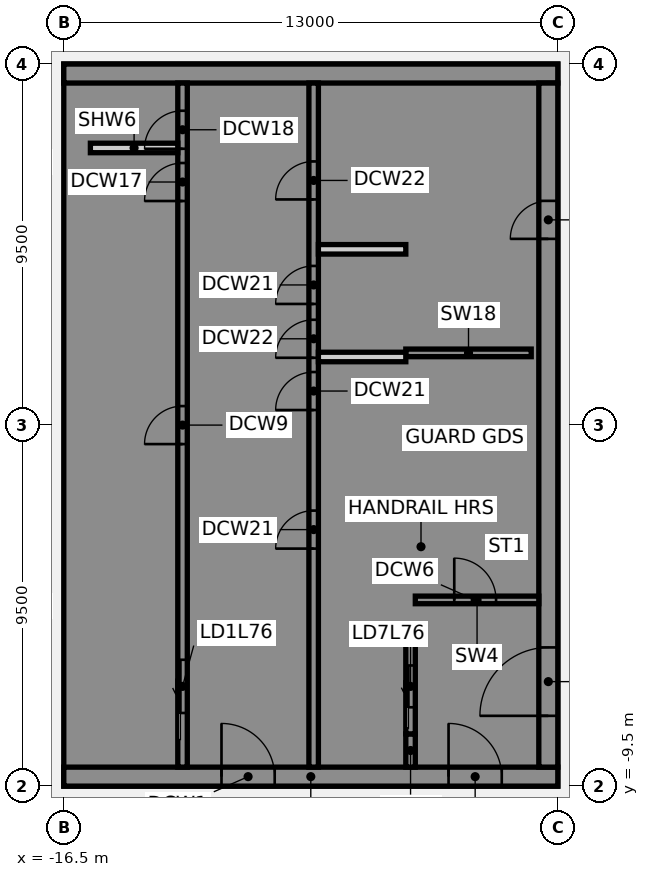
"""IFC4 building model, lengths in metres.
Left out: names, types, materials, properties, quantities, classifications, styles, units other than length and angle.
Written with IfcOpenShell. Run it as: python <this file> out.ifc"""

import sys

from ifc_helpers import new_model, si_unit, direction, frame, frame_2d, origin, place, context, subcontext, project, spatial, polyline, rectangle, outline, extrude, element, fill, save


model = new_model("IFC4")
c1 = context("Model", 3, precision=1e-05, world=origin(), true_north=direction((0.0, 1.0)))
c2 = subcontext(c1, "Body", "Model", "MODEL_VIEW")
j1 = project(units=[si_unit("LENGTHUNIT", "METRE"), si_unit("PLANEANGLEUNIT", "RADIAN")], contexts=[c1])
p1 = place(None, origin())
s1 = spatial("IfcSite", under=j1, at=p1, CompositionType="ELEMENT")
p2 = place(p1, origin())
s2 = spatial("IfcBuilding", under=s1, at=p2, CompositionType="ELEMENT")
p3 = place(p2, frame((0.0, 0.0, 309.4)))
s3 = spatial("IfcBuildingStorey", under=s2, at=p3, CompositionType="ELEMENT", Elevation=309.4)
p4 = place(p3, frame((-16.5, -9.25, 0.0), z_axis=(0.0, 0.0, 1.0), x_axis=(1.0, 0.0, 0.0)))
e1 = element("IfcWall", 1, at=p4, inside=s3, PredefinedType="SHEAR", context=c2, shape_type="SweptSolid", body=[
    extrude(rectangle(XDim=13.0, YDim=0.5, at=frame_2d((6.5, 0.0))), origin(), (0.0, 0.0, 1.0), 3.82),
])
p5 = place(p4, frame((4.15, 0.0, 0.0)))
e2 = element("IfcOpeningElement", 2, at=p5, cuts=e1, PredefinedType="OPENING", context=c2, shape_type="SweptSolid", body=[
    extrude(rectangle(XDim=1.4, YDim=2.1, at=frame_2d((0.7, 1.05))), frame((0.0, 0.26, 0.0), z_axis=(0.0, -1.0, 0.0), x_axis=(1.0, 0.0, 0.0)), (0.0, 0.0, 1.0), 0.52),
])
p6 = place(p4, frame((10.125, 0.0, 0.0)))
e3 = element("IfcOpeningElement", 3, at=p6, cuts=e1, PredefinedType="OPENING", context=c2, shape_type="SweptSolid", body=[
    extrude(rectangle(XDim=1.4, YDim=2.1, at=frame_2d((0.7, 1.05))), frame((0.0, 0.26, 0.0), z_axis=(0.0, -1.0, 0.0), x_axis=(1.0, 0.0, 0.0)), (0.0, 0.0, 1.0), 0.52),
])
p7 = place(p3, origin())
e4 = element("IfcWall", 4, at=p7, inside=s3, PredefinedType="SHEAR", context=c2, shape_type="SweptSolid", body=[
    extrude(outline(polyline([(-13.5, -8.125), (-16.0, -8.125), (-16.0, -5.625), (-13.5, -5.625), (-13.5, -5.375), (-16.0, -5.375), (-16.0, 8.125), (-13.5, 8.125), (-13.5, 9.0), (-16.0, 9.0), (-16.5, 9.0), (-16.5, -9.0), (-16.0, -9.0), (-13.5, -9.0), (-13.5, -8.125)])), origin(), (0.0, 0.0, 1.0), 3.82),
])
p8 = place(p3, frame((-16.5, 9.25, 0.0), z_axis=(0.0, 0.0, 1.0), x_axis=(1.0, 0.0, 0.0)))
e5 = element("IfcWall", 5, at=p8, inside=s3, PredefinedType="SHEAR", context=c2, shape_type="SweptSolid", body=[
    extrude(rectangle(XDim=13.0, YDim=0.5, at=frame_2d((6.5, 0.0))), origin(), (0.0, 0.0, 1.0), 3.82),
])
p9 = place(p3, origin())
e6 = element("IfcWall", 6, at=p9, inside=s3, PredefinedType="SHEAR", context=c2, shape_type="SweptSolid", body=[
    extrude(outline(polyline([(-9.8, -5.625), (-7.5, -5.625), (-7.25, -5.625), (-7.25, 9.0), (-7.5, 9.0), (-9.8, 9.0), (-9.8, 8.125), (-7.5, 8.125), (-7.5, -5.375), (-9.8, -5.375), (-9.8, -5.625)])), origin(), (0.0, 0.0, 1.0), 3.82),
])
p10 = place(p3, origin())
e7 = element("IfcWall", 7, at=p10, inside=s3, PredefinedType="SHEAR", context=c2, shape_type="SweptSolid", body=[
    extrude(outline(polyline([(-7.5, -8.125), (-9.55, -8.125), (-9.55, -5.625), (-9.8, -5.625), (-9.8, -8.125), (-9.8, -9.0), (-7.5, -9.0), (-7.5, -8.125)])), origin(), (0.0, 0.0, 1.0), 3.82),
])
p11 = place(p3, frame((-7.375, -9.0, 0.0), z_axis=(0.0, 0.0, 1.0), x_axis=(0.0, 1.0, 0.0)))
e8 = element("IfcWall", 8, at=p11, inside=s3, PredefinedType="SHEAR", context=c2, shape_type="SweptSolid", body=[
    extrude(rectangle(XDim=0.875, YDim=0.25, at=frame_2d((0.438, 0.0))), origin(), (0.0, 0.0, 1.0), 3.82),
])
p12 = place(p3, frame((-7.5, 1.9, 0.0), z_axis=(0.0, 0.0, 1.0), x_axis=(1.0, 0.0, 0.0)))
e9 = element("IfcWall", 9, at=p12, inside=s3, PredefinedType="SHEAR", context=c2, shape_type="SweptSolid", body=[
    extrude(rectangle(XDim=3.3, YDim=0.2, at=frame_2d((1.65, 0.0))), origin(), (0.0, 0.0, 1.0), 3.82),
])
p13 = place(p3, frame((-13.375, -9.0, 0.0), z_axis=(0.0, 0.0, 1.0), x_axis=(0.0, 1.0, 0.0)))
e10 = element("IfcWall", 10, at=p13, inside=s3, PredefinedType="SHEAR", context=c2, shape_type="SweptSolid", body=[
    extrude(rectangle(XDim=18.0, YDim=0.25, at=frame_2d((9.0, 0.0))), origin(), (0.0, 0.0, 1.0), 3.82),
])
p14 = place(p13, frame((1.425, 0.0, 0.0)))
e11 = element("IfcOpeningElement", 11, at=p14, cuts=e10, PredefinedType="OPENING", context=c2, shape_type="SweptSolid", body=[
    extrude(rectangle(XDim=1.4, YDim=2.1, at=frame_2d((0.7, 1.05))), frame((0.0, 0.135, 0.0), z_axis=(0.0, -1.0, 0.0), x_axis=(1.0, 0.0, 0.0)), (0.0, 0.0, 1.0), 0.27),
])
p15 = place(p13, frame((8.5, 0.0, 0.0)))
e12 = element("IfcOpeningElement", 12, at=p15, cuts=e10, PredefinedType="OPENING", context=c2, shape_type="SweptSolid", body=[
    extrude(rectangle(XDim=1.0, YDim=2.1, at=frame_2d((0.5, 1.05))), frame((0.0, 0.135, 0.0), z_axis=(0.0, -1.0, 0.0), x_axis=(1.0, 0.0, 0.0)), (0.0, 0.0, 1.0), 0.27),
])
p16 = place(p13, frame((14.896, 0.0, 0.0)))
e13 = element("IfcOpeningElement", 13, at=p16, cuts=e10, PredefinedType="OPENING", context=c2, shape_type="SweptSolid", body=[
    extrude(rectangle(XDim=1.0, YDim=2.1, at=frame_2d((0.5, 1.05))), frame((0.0, 0.135, 0.0), z_axis=(0.0, -1.0, 0.0), x_axis=(1.0, 0.0, 0.0)), (0.0, 0.0, 1.0), 0.27),
])
p17 = place(p13, frame((16.271, 0.0, 0.0)))
e14 = element("IfcOpeningElement", 14, at=p17, cuts=e10, PredefinedType="OPENING", context=c2, shape_type="SweptSolid", body=[
    extrude(rectangle(XDim=1.0, YDim=2.1, at=frame_2d((0.5, 1.05))), frame((0.0, 0.135, 0.0), z_axis=(0.0, -1.0, 0.0), x_axis=(1.0, 0.0, 0.0)), (0.0, 0.0, 1.0), 0.27),
])
p18 = place(p3, frame((-9.925, -9.0, 0.0), z_axis=(0.0, 0.0, 1.0), x_axis=(0.0, 1.0, 0.0)))
e15 = element("IfcWall", 15, at=p18, inside=s3, PredefinedType="SHEAR", context=c2, shape_type="SweptSolid", body=[
    extrude(rectangle(XDim=18.0, YDim=0.25, at=frame_2d((9.0, 0.0))), origin(), (0.0, 0.0, 1.0), 3.82),
])
p19 = place(p18, frame((5.75, 0.0, 0.0)))
e16 = element("IfcOpeningElement", 16, at=p19, cuts=e15, PredefinedType="OPENING", context=c2, shape_type="SweptSolid", body=[
    extrude(rectangle(XDim=1.0, YDim=2.1, at=frame_2d((0.5, 1.05))), frame((0.0, 0.135, 0.0), z_axis=(0.0, -1.0, 0.0), x_axis=(1.0, 0.0, 0.0)), (0.0, 0.0, 1.0), 0.27),
])
p20 = place(p18, frame((9.396, 0.0, 0.0)))
e17 = element("IfcOpeningElement", 17, at=p20, cuts=e15, PredefinedType="OPENING", context=c2, shape_type="SweptSolid", body=[
    extrude(rectangle(XDim=1.0, YDim=2.1, at=frame_2d((0.5, 1.05))), frame((0.0, 0.135, 0.0), z_axis=(0.0, -1.0, 0.0), x_axis=(1.0, 0.0, 0.0)), (0.0, 0.0, 1.0), 0.27),
])
p21 = place(p18, frame((10.771, 0.0, 0.0)))
e18 = element("IfcOpeningElement", 18, at=p21, cuts=e15, PredefinedType="OPENING", context=c2, shape_type="SweptSolid", body=[
    extrude(rectangle(XDim=1.0, YDim=2.1, at=frame_2d((0.5, 1.05))), frame((0.0, 0.135, 0.0), z_axis=(0.0, -1.0, 0.0), x_axis=(1.0, 0.0, 0.0)), (0.0, 0.0, 1.0), 0.27),
])
p22 = place(p18, frame((12.188, 0.0, 0.0)))
e19 = element("IfcOpeningElement", 19, at=p22, cuts=e15, PredefinedType="OPENING", context=c2, shape_type="SweptSolid", body=[
    extrude(rectangle(XDim=1.0, YDim=2.1, at=frame_2d((0.5, 1.05))), frame((0.0, 0.135, 0.0), z_axis=(0.0, -1.0, 0.0), x_axis=(1.0, 0.0, 0.0)), (0.0, 0.0, 1.0), 0.27),
])
p23 = place(p18, frame((14.938, 0.0, 0.0)))
e20 = element("IfcOpeningElement", 20, at=p23, cuts=e15, PredefinedType="OPENING", context=c2, shape_type="SweptSolid", body=[
    extrude(rectangle(XDim=1.0, YDim=2.1, at=frame_2d((0.5, 1.05))), frame((0.0, 0.135, 0.0), z_axis=(0.0, -1.0, 0.0), x_axis=(1.0, 0.0, 0.0)), (0.0, 0.0, 1.0), 0.27),
])
p24 = place(p3, frame((-7.375, -8.125, 0.0), z_axis=(0.0, 0.0, 1.0), x_axis=(0.0, 1.0, 0.0)))
e21 = element("IfcWall", 21, at=p24, inside=s3, PredefinedType="SHEAR", context=c2, shape_type="SweptSolid", body=[
    extrude(rectangle(XDim=2.5, YDim=0.25, at=frame_2d((1.25, 0.0))), origin(), (0.0, 0.0, 1.0), 3.82),
])
p25 = place(p24, frame((0.7, 0.0, 0.0)))
e22 = element("IfcOpeningElement", 22, at=p25, cuts=e21, PredefinedType="OPENING", context=c2, shape_type="SweptSolid", body=[
    extrude(rectangle(XDim=1.1, YDim=2.1, at=frame_2d((0.55, 1.05))), frame((0.0, 0.135, 0.0), z_axis=(0.0, -1.0, 0.0), x_axis=(1.0, 0.0, 0.0)), (0.0, 0.0, 1.0), 0.27),
])
p26 = place(p3, frame((-3.75, -9.0, 0.0), z_axis=(0.0, 0.0, 1.0), x_axis=(0.0, 1.0, 0.0)))
e23 = element("IfcWall", 23, at=p26, inside=s3, PredefinedType="SHEAR", context=c2, shape_type="SweptSolid", body=[
    extrude(rectangle(XDim=18.0, YDim=0.5, at=frame_2d((9.0, 0.0))), origin(), (0.0, 0.0, 1.0), 3.82),
])
p27 = place(p26, frame((1.35, 0.0, 0.0)))
e24 = element("IfcOpeningElement", 24, at=p27, cuts=e23, PredefinedType="OPENING", context=c2, shape_type="SweptSolid", body=[
    extrude(rectangle(XDim=1.8, YDim=2.1, at=frame_2d((0.9, 1.05))), frame((0.0, 0.26, 0.0), z_axis=(0.0, -1.0, 0.0), x_axis=(1.0, 0.0, 0.0)), (0.0, 0.0, 1.0), 0.52),
])
p28 = place(p26, frame((13.9, 0.0, 0.0)))
e25 = element("IfcOpeningElement", 25, at=p28, cuts=e23, PredefinedType="OPENING", context=c2, shape_type="SweptSolid", body=[
    extrude(rectangle(XDim=1.0, YDim=2.1, at=frame_2d((0.5, 1.05))), frame((0.0, 0.26, 0.0), z_axis=(0.0, -1.0, 0.0), x_axis=(1.0, 0.0, 0.0)), (0.0, 0.0, 1.0), 0.52),
])
p29 = place(p3, frame((-7.25, -4.6, 0.0), z_axis=(0.0, 0.0, 1.0), x_axis=(1.0, 0.0, 0.0)))
e26 = element("IfcWall", 26, at=p29, inside=s3, PredefinedType="SHEAR", context=c2, shape_type="SweptSolid", body=[
    extrude(rectangle(XDim=3.25, YDim=0.2, at=frame_2d((1.625, 0.0))), origin(), (0.0, 0.0, 1.0), 3.82),
])
p30 = place(p29, frame((1.025, 0.0, 0.0)))
e27 = element("IfcOpeningElement", 27, at=p30, cuts=e26, PredefinedType="OPENING", context=c2, shape_type="SweptSolid", body=[
    extrude(rectangle(XDim=1.1, YDim=2.1, at=frame_2d((0.55, 1.05))), frame((0.0, 0.11, 0.0), z_axis=(0.0, -1.0, 0.0), x_axis=(1.0, 0.0, 0.0)), (0.0, 0.0, 1.0), 0.22),
])
for number, where, z_axis, x_axis in (
    (28, (-15.8, 7.292, 0.0), (0.0, 0.0, 1.0), (1.0, 0.0, 0.0)),
    (29, (-9.8, 1.792, 0.0), (0.0, 0.0, 1.0), (1.0, 0.0, 0.0)),
    (30, (-9.8, 4.625, 0.0), (0.0, 0.0, 1.0), (1.0, 0.0, 0.0)),
):
    element("IfcWall", number, at=place(p3, frame(where, z_axis=z_axis, x_axis=x_axis)), inside=s3, PredefinedType="PARTITIONING", context=c2, shape_type="SweptSolid", body=[
        extrude(rectangle(XDim=2.3, YDim=0.25, at=frame_2d((1.15, 0.0))), origin(), (0.0, 0.0, 1.0), 3.82),
    ])
p31 = place(p5, origin())
e31 = element("IfcDoor", 31, at=p31, inside=s3, OperationType="SINGLE_SWING_LEFT", PredefinedType="DOOR", context=c2, shape_type="SweptSolid", body=[
    extrude(rectangle(XDim=1.4, YDim=2.1, at=frame_2d((0.7, 1.05))), frame((0.0, 0.025, 0.0), z_axis=(0.0, -1.0, 0.0), x_axis=(1.0, 0.0, 0.0)), (0.0, 0.0, 1.0), 0.05),
])
fill(e2, e31)
p32 = place(p6, origin())
e32 = element("IfcDoor", 32, at=p32, inside=s3, OperationType="SINGLE_SWING_LEFT", PredefinedType="DOOR", context=c2, shape_type="SweptSolid", body=[
    extrude(rectangle(XDim=1.4, YDim=2.1, at=frame_2d((0.7, 1.05))), frame((0.0, 0.025, 0.0), z_axis=(0.0, -1.0, 0.0), x_axis=(1.0, 0.0, 0.0)), (0.0, 0.0, 1.0), 0.05),
])
fill(e3, e32)
p33 = place(p27, origin())
e33 = element("IfcDoor", 33, at=p33, inside=s3, OperationType="SINGLE_SWING_LEFT", PredefinedType="DOOR", context=c2, shape_type="SweptSolid", body=[
    extrude(rectangle(XDim=1.8, YDim=2.1, at=frame_2d((0.9, 1.05))), frame((0.0, 0.025, 0.0), z_axis=(0.0, -1.0, 0.0), x_axis=(1.0, 0.0, 0.0)), (0.0, 0.0, 1.0), 0.05),
])
fill(e24, e33)
p34 = place(p28, origin())
e34 = element("IfcDoor", 34, at=p34, inside=s3, OperationType="SINGLE_SWING_LEFT", PredefinedType="DOOR", context=c2, shape_type="SweptSolid", body=[
    extrude(rectangle(XDim=1.0, YDim=2.1, at=frame_2d((0.5, 1.05))), frame((0.0, 0.025, 0.0), z_axis=(0.0, -1.0, 0.0), x_axis=(1.0, 0.0, 0.0)), (0.0, 0.0, 1.0), 0.05),
])
fill(e25, e34)
p35 = place(p30, origin())
e35 = element("IfcDoor", 35, at=p35, inside=s3, OperationType="SINGLE_SWING_LEFT", PredefinedType="DOOR", context=c2, shape_type="SweptSolid", body=[
    extrude(rectangle(XDim=1.1, YDim=2.1, at=frame_2d((0.55, 1.05))), frame((0.0, 0.025, 0.0), z_axis=(0.0, -1.0, 0.0), x_axis=(1.0, 0.0, 0.0)), (0.0, 0.0, 1.0), 0.05),
])
fill(e27, e35)
p36 = place(p14, origin())
e36 = element("IfcDoor", 36, at=p36, inside=s3, OperationType="SLIDING_TO_LEFT", PredefinedType="DOOR", context=c2, shape_type="SweptSolid", body=[
    extrude(rectangle(XDim=1.4, YDim=2.1, at=frame_2d((0.7, 1.05))), frame((0.0, 0.025, 0.0), z_axis=(0.0, -1.0, 0.0), x_axis=(1.0, 0.0, 0.0)), (0.0, 0.0, 1.0), 0.05),
])
fill(e11, e36)
p37 = place(p25, origin())
e37 = element("IfcDoor", 37, at=p37, inside=s3, OperationType="SLIDING_TO_LEFT", PredefinedType="DOOR", context=c2, shape_type="SweptSolid", body=[
    extrude(rectangle(XDim=1.1, YDim=2.1, at=frame_2d((0.55, 1.05))), frame((0.0, 0.025, 0.0), z_axis=(0.0, -1.0, 0.0), x_axis=(1.0, 0.0, 0.0)), (0.0, 0.0, 1.0), 0.05),
])
fill(e22, e37)
p38 = place(p15, origin())
e38 = element("IfcDoor", 38, at=p38, inside=s3, OperationType="SINGLE_SWING_LEFT", PredefinedType="DOOR", context=c2, shape_type="SweptSolid", body=[
    extrude(rectangle(XDim=1.0, YDim=2.1, at=frame_2d((0.5, 1.05))), frame((0.0, 0.025, 0.0), z_axis=(0.0, -1.0, 0.0), x_axis=(1.0, 0.0, 0.0)), (0.0, 0.0, 1.0), 0.05),
])
fill(e12, e38)
p39 = place(p16, origin())
e39 = element("IfcDoor", 39, at=p39, inside=s3, OperationType="SINGLE_SWING_LEFT", PredefinedType="DOOR", context=c2, shape_type="SweptSolid", body=[
    extrude(rectangle(XDim=1.0, YDim=2.1, at=frame_2d((0.5, 1.05))), frame((0.0, 0.025, 0.0), z_axis=(0.0, -1.0, 0.0), x_axis=(1.0, 0.0, 0.0)), (0.0, 0.0, 1.0), 0.05),
])
fill(e13, e39)
p40 = place(p17, origin())
e40 = element("IfcDoor", 40, at=p40, inside=s3, OperationType="SINGLE_SWING_LEFT", PredefinedType="DOOR", context=c2, shape_type="SweptSolid", body=[
    extrude(rectangle(XDim=1.0, YDim=2.1, at=frame_2d((0.5, 1.05))), frame((0.0, 0.025, 0.0), z_axis=(0.0, -1.0, 0.0), x_axis=(1.0, 0.0, 0.0)), (0.0, 0.0, 1.0), 0.05),
])
fill(e14, e40)
p41 = place(p19, origin())
e41 = element("IfcDoor", 41, at=p41, inside=s3, OperationType="SINGLE_SWING_LEFT", PredefinedType="DOOR", context=c2, shape_type="SweptSolid", body=[
    extrude(rectangle(XDim=1.0, YDim=2.1, at=frame_2d((0.5, 1.05))), frame((0.0, 0.025, 0.0), z_axis=(0.0, -1.0, 0.0), x_axis=(1.0, 0.0, 0.0)), (0.0, 0.0, 1.0), 0.05),
])
fill(e16, e41)
p42 = place(p20, origin())
e42 = element("IfcDoor", 42, at=p42, inside=s3, OperationType="SINGLE_SWING_LEFT", PredefinedType="DOOR", context=c2, shape_type="SweptSolid", body=[
    extrude(rectangle(XDim=1.0, YDim=2.1, at=frame_2d((0.5, 1.05))), frame((0.0, 0.025, 0.0), z_axis=(0.0, -1.0, 0.0), x_axis=(1.0, 0.0, 0.0)), (0.0, 0.0, 1.0), 0.05),
])
fill(e17, e42)
p43 = place(p21, origin())
e43 = element("IfcDoor", 43, at=p43, inside=s3, OperationType="SINGLE_SWING_LEFT", PredefinedType="DOOR", context=c2, shape_type="SweptSolid", body=[
    extrude(rectangle(XDim=1.0, YDim=2.1, at=frame_2d((0.5, 1.05))), frame((0.0, 0.025, 0.0), z_axis=(0.0, -1.0, 0.0), x_axis=(1.0, 0.0, 0.0)), (0.0, 0.0, 1.0), 0.05),
])
fill(e18, e43)
p44 = place(p22, origin())
e44 = element("IfcDoor", 44, at=p44, inside=s3, OperationType="SINGLE_SWING_LEFT", PredefinedType="DOOR", context=c2, shape_type="SweptSolid", body=[
    extrude(rectangle(XDim=1.0, YDim=2.1, at=frame_2d((0.5, 1.05))), frame((0.0, 0.025, 0.0), z_axis=(0.0, -1.0, 0.0), x_axis=(1.0, 0.0, 0.0)), (0.0, 0.0, 1.0), 0.05),
])
fill(e19, e44)
p45 = place(p23, origin())
e45 = element("IfcDoor", 45, at=p45, inside=s3, OperationType="SINGLE_SWING_LEFT", PredefinedType="DOOR", context=c2, shape_type="SweptSolid", body=[
    extrude(rectangle(XDim=1.0, YDim=2.1, at=frame_2d((0.5, 1.05))), frame((0.0, 0.025, 0.0), z_axis=(0.0, -1.0, 0.0), x_axis=(1.0, 0.0, 0.0)), (0.0, 0.0, 1.0), 0.05),
])
fill(e20, e45)
save(model, sys.argv[1])
